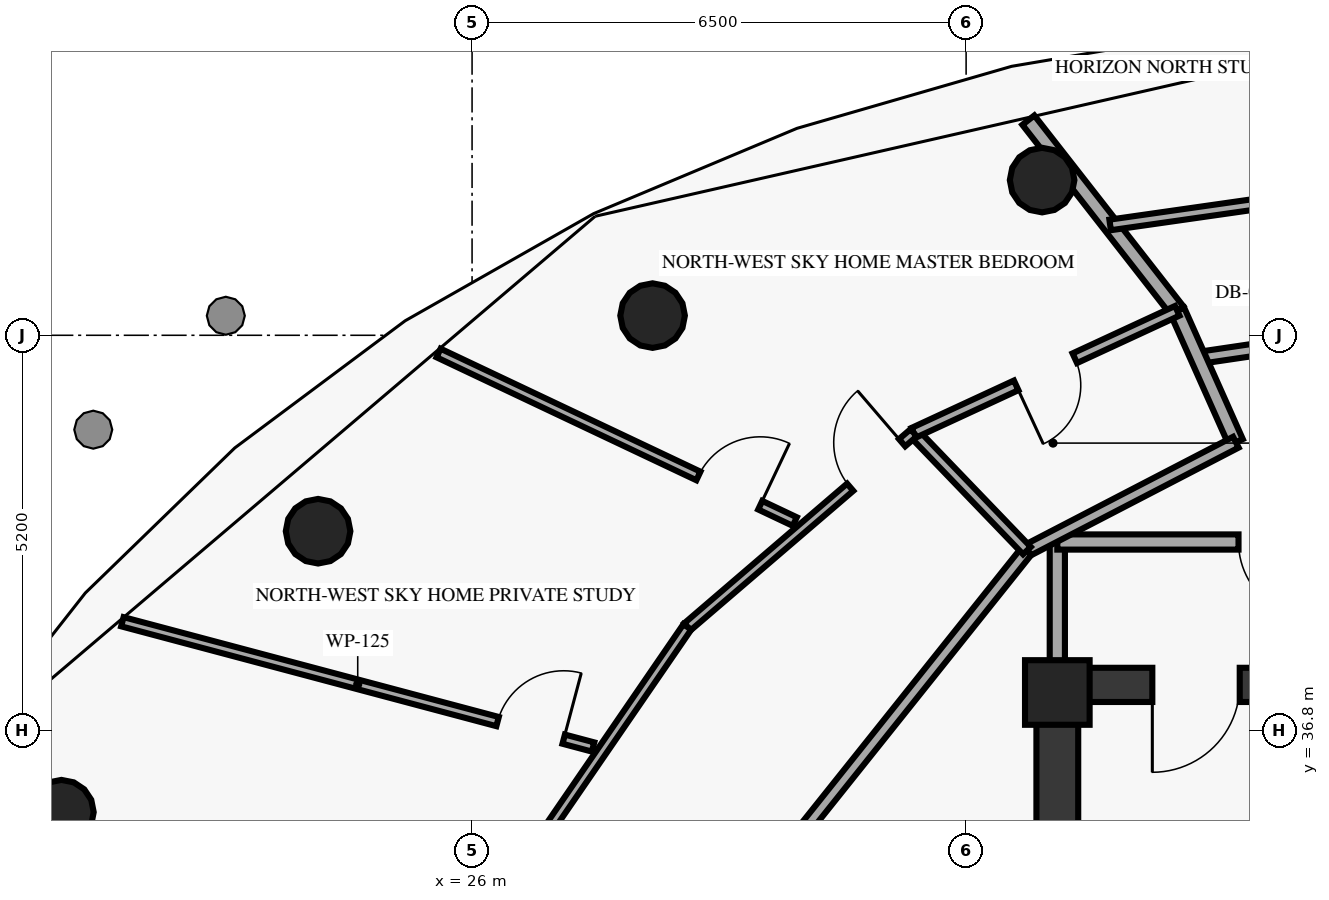
"""IFC4 building model, lengths in metres.
Left out: names, types, materials, properties, quantities, classifications, styles, units other than length and angle.
Written with IfcOpenShell. Run it as: python <this file> out.ifc"""

import sys

from ifc_helpers import new_model, si_unit, direction, frame, frame_2d, origin, origin_2d, place, context, subcontext, project, spatial, rectangle, circle, extrude, element, fill, save


model = new_model("IFC4")
c1 = context("Model", 3, precision=1e-05, world=origin(), true_north=direction((0.0, 1.0)))
c2 = subcontext(c1, "Body", "Model", "MODEL_VIEW")
j1 = project(units=[si_unit("LENGTHUNIT", "METRE"), si_unit("PLANEANGLEUNIT", "RADIAN")], contexts=[c1])
p1 = place(None, origin())
s1 = spatial("IfcSite", under=j1, at=p1, CompositionType="ELEMENT")
p2 = place(p1, origin())
s2 = spatial("IfcBuilding", under=s1, at=p2, CompositionType="ELEMENT")
p3 = place(p2, frame((0.0, 0.0, 251.95)))
s3 = spatial("IfcBuildingStorey", under=s2, at=p3, CompositionType="ELEMENT", Elevation=251.95)
p4 = place(p3, frame((33.7, 37.3, 0.0), z_axis=(0.0, 0.0, 1.0), x_axis=(1.0, 0.0, 0.0)))
e1 = element("IfcColumn", 1, at=p4, inside=s3, PredefinedType="PILASTER", context=c2, shape_type="SweptSolid", body=[
    extrude(rectangle(XDim=0.85, YDim=0.85, at=origin_2d()), origin(), (0.0, 0.0, 1.0), 3.39),
])
for number, where, z_axis, x_axis in (
    (2, (33.5, 44.042, 0.0), (0.0, 0.0, 1.0), (1.0, 0.0, 0.0)),
    (3, (28.375, 42.259, 0.0), (0.0, 0.0, 1.0), (1.0, 0.0, 0.0)),
    (4, (23.974, 39.422, 0.0), (0.0, 0.0, 1.0), (1.0, 0.0, 0.0)),
    (5, (20.597, 35.725, 0.0), (0.0, 0.0, 1.0), (1.0, 0.0, 0.0)),
):
    element("IfcColumn", number, at=place(p3, frame(where, z_axis=z_axis, x_axis=x_axis)), inside=s3, PredefinedType="COLUMN", context=c2, shape_type="SweptSolid", body=[
        extrude(circle(Radius=0.425, at=origin_2d()), origin(), (0.0, 0.0, 1.0), 3.39),
    ])
p5 = place(p3, frame((33.7, 29.05, 0.0), z_axis=(0.0, 0.0, 1.0), x_axis=(0.0, 1.0, 0.0)))
e6 = element("IfcWall", 6, at=p5, inside=s3, PredefinedType="SHEAR", context=c2, shape_type="SweptSolid", body=[
    extrude(rectangle(XDim=8.35, YDim=0.55, at=frame_2d((4.175, 0.0))), origin(), (0.0, 0.0, 1.0), 3.39),
])
p6 = place(p3, frame((37.35, 37.4, 0.0), z_axis=(0.0, 0.0, 1.0), x_axis=(-1.0, 0.0, 0.0)))
e7 = element("IfcWall", 7, at=p6, inside=s3, PredefinedType="SHEAR", context=c2, shape_type="SweptSolid", body=[
    extrude(rectangle(XDim=3.65, YDim=0.45, at=frame_2d((1.825, 0.0))), origin(), (0.0, 0.0, 1.0), 3.39),
])
p7 = place(p6, frame((1.25, 0.0, 0.0)))
e8 = element("IfcOpeningElement", 8, at=p7, cuts=e7, PredefinedType="OPENING", context=c2, shape_type="SweptSolid", body=[
    extrude(rectangle(XDim=1.15, YDim=2.15, at=frame_2d((0.575, 1.075))), frame((0.0, 0.235, 0.0), z_axis=(0.0, -1.0, 0.0), x_axis=(1.0, 0.0, 0.0)), (0.0, 0.0, 1.0), 0.47),
])
p8 = place(p3, frame((33.7, 37.4, 0.0), z_axis=(0.0, 0.0, 1.0), x_axis=(0.0, 1.0, 0.0)))
e9 = element("IfcWall", 9, at=p8, inside=s3, PredefinedType="SOLIDWALL", context=c2, shape_type="SweptSolid", body=[
    extrude(rectangle(XDim=1.88, YDim=0.2, at=frame_2d((0.94, 0.0))), origin(), (0.0, 0.0, 1.0), 3.39),
])
p9 = place(p3, frame((38.9, 39.28, 0.0), z_axis=(0.0, 0.0, 1.0), x_axis=(-1.0, 0.0, 0.0)))
e10 = element("IfcWall", 10, at=p9, inside=s3, PredefinedType="SOLIDWALL", context=c2, shape_type="SweptSolid", body=[
    extrude(rectangle(XDim=5.2, YDim=0.2, at=frame_2d((2.6, 0.0))), origin(), (0.0, 0.0, 1.0), 3.39),
])
p10 = place(p9, frame((1.816, 0.0, 0.0)))
e11 = element("IfcOpeningElement", 11, at=p10, cuts=e10, PredefinedType="OPENING", context=c2, shape_type="SweptSolid", body=[
    extrude(rectangle(XDim=1.0, YDim=2.02, at=frame_2d((0.5, 1.01))), frame((0.0, 0.11, 0.0), z_axis=(0.0, -1.0, 0.0), x_axis=(1.0, 0.0, 0.0)), (0.0, 0.0, 1.0), 0.22),
])
p11 = place(p3, frame((39.0, 42.21, 0.0), z_axis=(0.0, 0.0, 1.0), x_axis=(-0.989259474357, -0.146170080365, 0.0)))
e12 = element("IfcWall", 12, at=p11, inside=s3, PredefinedType="PARTITIONING", context=c2, shape_type="SweptSolid", body=[
    extrude(rectangle(XDim=3.482, YDim=0.16, at=frame_2d((1.741, 0.0))), origin(), (0.0, 0.0, 1.0), 3.39),
])
p12 = place(p3, frame((36.049, 40.593, 0.0), z_axis=(0.0, 0.0, 1.0), x_axis=(-0.407262922325, 0.913310961338, 0.0)))
e13 = element("IfcWall", 13, at=p12, inside=s3, PredefinedType="PARTITIONING", context=c2, shape_type="SweptSolid", body=[
    extrude(rectangle(XDim=1.893, YDim=0.2, at=frame_2d((0.947, 0.0))), origin(), (0.0, 0.0, 1.0), 3.39),
])
p13 = place(p3, frame((35.278, 42.322, 0.0), z_axis=(0.0, 0.0, 1.0), x_axis=(-0.615410344966, 0.788206893721, 0.0)))
e14 = element("IfcWall", 14, at=p13, inside=s3, PredefinedType="PARTITIONING", context=c2, shape_type="SweptSolid", body=[
    extrude(rectangle(XDim=3.183, YDim=0.2, at=frame_2d((1.592, 0.0))), origin(), (0.0, 0.0, 1.0), 3.39),
])
p14 = place(p3, frame((34.395, 43.452, 0.0), z_axis=(0.0, 0.0, 1.0), x_axis=(0.989938994285, 0.141494832393, 0.0)))
e15 = element("IfcWall", 15, at=p14, inside=s3, PredefinedType="PARTITIONING", context=c2, shape_type="SweptSolid", body=[
    extrude(rectangle(XDim=4.652, YDim=0.14, at=frame_2d((2.326, 0.0))), origin(), (0.0, 0.0, 1.0), 3.39),
])
p15 = place(p14, frame((2.14, 0.0, 0.0)))
e16 = element("IfcOpeningElement", 16, at=p15, cuts=e15, PredefinedType="OPENING", context=c2, shape_type="SweptSolid", body=[
    extrude(rectangle(XDim=0.85, YDim=2.02, at=frame_2d((0.425, 1.01))), frame((0.0, 0.08, 0.0), z_axis=(0.0, -1.0, 0.0), x_axis=(1.0, 0.0, 0.0)), (0.0, 0.0, 1.0), 0.16),
])
p16 = place(p3, frame((36.049, 40.593, 0.0), z_axis=(0.0, 0.0, 1.0), x_axis=(-0.887674575788, -0.460471331898, 0.0)))
e17 = element("IfcWall", 17, at=p16, inside=s3, PredefinedType="PARTITIONING", context=c2, shape_type="SweptSolid", body=[
    extrude(rectangle(XDim=3.097, YDim=0.16, at=frame_2d((1.548, 0.0))), origin(), (0.0, 0.0, 1.0), 3.39),
])
p17 = place(p3, frame((33.3, 39.167, 0.0), z_axis=(0.0, 0.0, 1.0), x_axis=(-0.623915746766, -0.781491612839, 0.0)))
e18 = element("IfcWall", 18, at=p17, inside=s3, PredefinedType="PARTITIONING", context=c2, shape_type="SweptSolid", body=[
    extrude(rectangle(XDim=6.688, YDim=0.16, at=frame_2d((3.344, 0.0))), origin(), (0.0, 0.0, 1.0), 3.39),
])
p18 = place(p3, frame((33.3, 39.167, 0.0), z_axis=(0.0, 0.0, 1.0), x_axis=(-0.693002052722, 0.720935610803, 0.0)))
e19 = element("IfcWall", 19, at=p18, inside=s3, PredefinedType="PARTITIONING", context=c2, shape_type="SweptSolid", body=[
    extrude(rectangle(XDim=2.15, YDim=0.14, at=frame_2d((1.075, 0.0))), origin(), (0.0, 0.0, 1.0), 3.39),
])
p19 = place(p3, frame((31.81, 40.717, 0.0), z_axis=(0.0, 0.0, 1.0), x_axis=(0.907525084777, 0.419997881543, 0.0)))
e20 = element("IfcWall", 20, at=p19, inside=s3, PredefinedType="PARTITIONING", context=c2, shape_type="SweptSolid", body=[
    extrude(rectangle(XDim=3.821, YDim=0.14, at=frame_2d((1.911, 0.0))), origin(), (0.0, 0.0, 1.0), 3.39),
])
p20 = place(p19, frame((1.486, 0.0, 0.0)))
e21 = element("IfcOpeningElement", 21, at=p20, cuts=e20, PredefinedType="OPENING", context=c2, shape_type="SweptSolid", body=[
    extrude(rectangle(XDim=0.85, YDim=2.02, at=frame_2d((0.425, 1.01))), frame((0.0, 0.08, 0.0), z_axis=(0.0, -1.0, 0.0), x_axis=(1.0, 0.0, 0.0)), (0.0, 0.0, 1.0), 0.16),
])
p21 = place(p3, frame((28.832, 38.163, 0.0), z_axis=(0.0, 0.0, 1.0), x_axis=(0.759085259689, 0.650991220004, 0.0)))
e22 = element("IfcWall", 22, at=p21, inside=s3, PredefinedType="PARTITIONING", context=c2, shape_type="SweptSolid", body=[
    extrude(rectangle(XDim=3.923, YDim=0.125, at=frame_2d((1.961, 0.0))), origin(), (0.0, 0.0, 1.0), 3.39),
])
p22 = place(p21, frame((2.823, 0.0, 0.0)))
e23 = element("IfcOpeningElement", 23, at=p22, cuts=e22, PredefinedType="OPENING", context=c2, shape_type="SweptSolid", body=[
    extrude(rectangle(XDim=0.9, YDim=2.02, at=frame_2d((0.45, 1.01))), frame((0.0, 0.073, 0.0), z_axis=(0.0, -1.0, 0.0), x_axis=(1.0, 0.0, 0.0)), (0.0, 0.0, 1.0), 0.145),
])
p23 = place(p3, frame((28.832, 38.163, 0.0), z_axis=(0.0, 0.0, 1.0), x_axis=(-0.565994846929, -0.824408778004, 0.0)))
e24 = element("IfcWall", 24, at=p23, inside=s3, PredefinedType="PARTITIONING", context=c2, shape_type="SweptSolid", body=[
    extrude(rectangle(XDim=4.037, YDim=0.125, at=frame_2d((2.019, 0.0))), origin(), (0.0, 0.0, 1.0), 3.39),
])
p24 = place(p3, frame((30.246, 39.549, 0.0), z_axis=(0.0, 0.0, 1.0), x_axis=(-0.903897878918, 0.427748319094, 0.0)))
e25 = element("IfcWall", 25, at=p24, inside=s3, PredefinedType="PARTITIONING", context=c2, shape_type="SweptSolid", body=[
    extrude(rectangle(XDim=5.185, YDim=0.125, at=frame_2d((2.593, 0.0))), origin(), (0.0, 0.0, 1.0), 3.39),
])
p25 = place(p24, frame((0.503, 0.0, 0.0)))
e26 = element("IfcOpeningElement", 26, at=p25, cuts=e25, PredefinedType="OPENING", context=c2, shape_type="SweptSolid", body=[
    extrude(rectangle(XDim=0.9, YDim=2.02, at=frame_2d((0.45, 1.01))), frame((0.0, 0.073, 0.0), z_axis=(0.0, -1.0, 0.0), x_axis=(1.0, 0.0, 0.0)), (0.0, 0.0, 1.0), 0.145),
])
p26 = place(p3, frame((27.592, 36.583, 0.0), z_axis=(0.0, 0.0, 1.0), x_axis=(-0.966372641244, 0.257145714053, 0.0)))
e27 = element("IfcWall", 27, at=p26, inside=s3, PredefinedType="PARTITIONING", context=c2, shape_type="SweptSolid", body=[
    extrude(rectangle(XDim=6.409, YDim=0.125, at=frame_2d((3.204, 0.0))), origin(), (0.0, 0.0, 1.0), 3.39),
])
p27 = place(p26, frame((0.4, 0.0, 0.0)))
e28 = element("IfcOpeningElement", 28, at=p27, cuts=e27, PredefinedType="OPENING", context=c2, shape_type="SweptSolid", body=[
    extrude(rectangle(XDim=0.9, YDim=2.02, at=frame_2d((0.45, 1.01))), frame((0.0, 0.073, 0.0), z_axis=(0.0, -1.0, 0.0), x_axis=(1.0, 0.0, 0.0)), (0.0, 0.0, 1.0), 0.145),
])
p28 = place(p7, origin())
e29 = element("IfcDoor", 29, at=p28, inside=s3, OperationType="SINGLE_SWING_RIGHT", PredefinedType="DOOR", context=c2, shape_type="SweptSolid", body=[
    extrude(rectangle(XDim=1.15, YDim=2.15, at=frame_2d((0.575, 1.075))), frame((0.0, 0.025, 0.0), z_axis=(0.0, -1.0, 0.0), x_axis=(1.0, 0.0, 0.0)), (0.0, 0.0, 1.0), 0.05),
])
fill(e8, e29)
p29 = place(p10, origin())
e30 = element("IfcDoor", 30, at=p29, inside=s3, OperationType="SINGLE_SWING_LEFT", PredefinedType="DOOR", context=c2, shape_type="SweptSolid", body=[
    extrude(rectangle(XDim=1.0, YDim=2.02, at=frame_2d((0.5, 1.01))), frame((0.0, 0.025, 0.0), z_axis=(0.0, -1.0, 0.0), x_axis=(1.0, 0.0, 0.0)), (0.0, 0.0, 1.0), 0.05),
])
fill(e11, e30)
p30 = place(p20, origin())
e31 = element("IfcDoor", 31, at=p30, inside=s3, OperationType="SINGLE_SWING_LEFT", PredefinedType="DOOR", context=c2, shape_type="SweptSolid", body=[
    extrude(rectangle(XDim=0.85, YDim=2.02, at=frame_2d((0.425, 1.01))), frame((0.0, 0.025, 0.0), z_axis=(0.0, -1.0, 0.0), x_axis=(1.0, 0.0, 0.0)), (0.0, 0.0, 1.0), 0.05),
])
fill(e21, e31)
p31 = place(p22, origin())
e32 = element("IfcDoor", 32, at=p31, inside=s3, OperationType="SINGLE_SWING_RIGHT", PredefinedType="DOOR", context=c2, shape_type="SweptSolid", body=[
    extrude(rectangle(XDim=0.9, YDim=2.02, at=frame_2d((0.45, 1.01))), frame((0.0, 0.025, 0.0), z_axis=(0.0, -1.0, 0.0), x_axis=(1.0, 0.0, 0.0)), (0.0, 0.0, 1.0), 0.05),
])
fill(e23, e32)
p32 = place(p25, origin())
e33 = element("IfcDoor", 33, at=p32, inside=s3, OperationType="SINGLE_SWING_LEFT", PredefinedType="DOOR", context=c2, shape_type="SweptSolid", body=[
    extrude(rectangle(XDim=0.9, YDim=2.02, at=frame_2d((0.45, 1.01))), frame((0.0, 0.025, 0.0), z_axis=(0.0, -1.0, 0.0), x_axis=(1.0, 0.0, 0.0)), (0.0, 0.0, 1.0), 0.05),
])
fill(e26, e33)
p33 = place(p27, origin())
e34 = element("IfcDoor", 34, at=p33, inside=s3, OperationType="SINGLE_SWING_LEFT", PredefinedType="DOOR", context=c2, shape_type="SweptSolid", body=[
    extrude(rectangle(XDim=0.9, YDim=2.02, at=frame_2d((0.45, 1.01))), frame((0.0, 0.025, 0.0), z_axis=(0.0, -1.0, 0.0), x_axis=(1.0, 0.0, 0.0)), (0.0, 0.0, 1.0), 0.05),
])
fill(e28, e34)
save(model, sys.argv[1])
